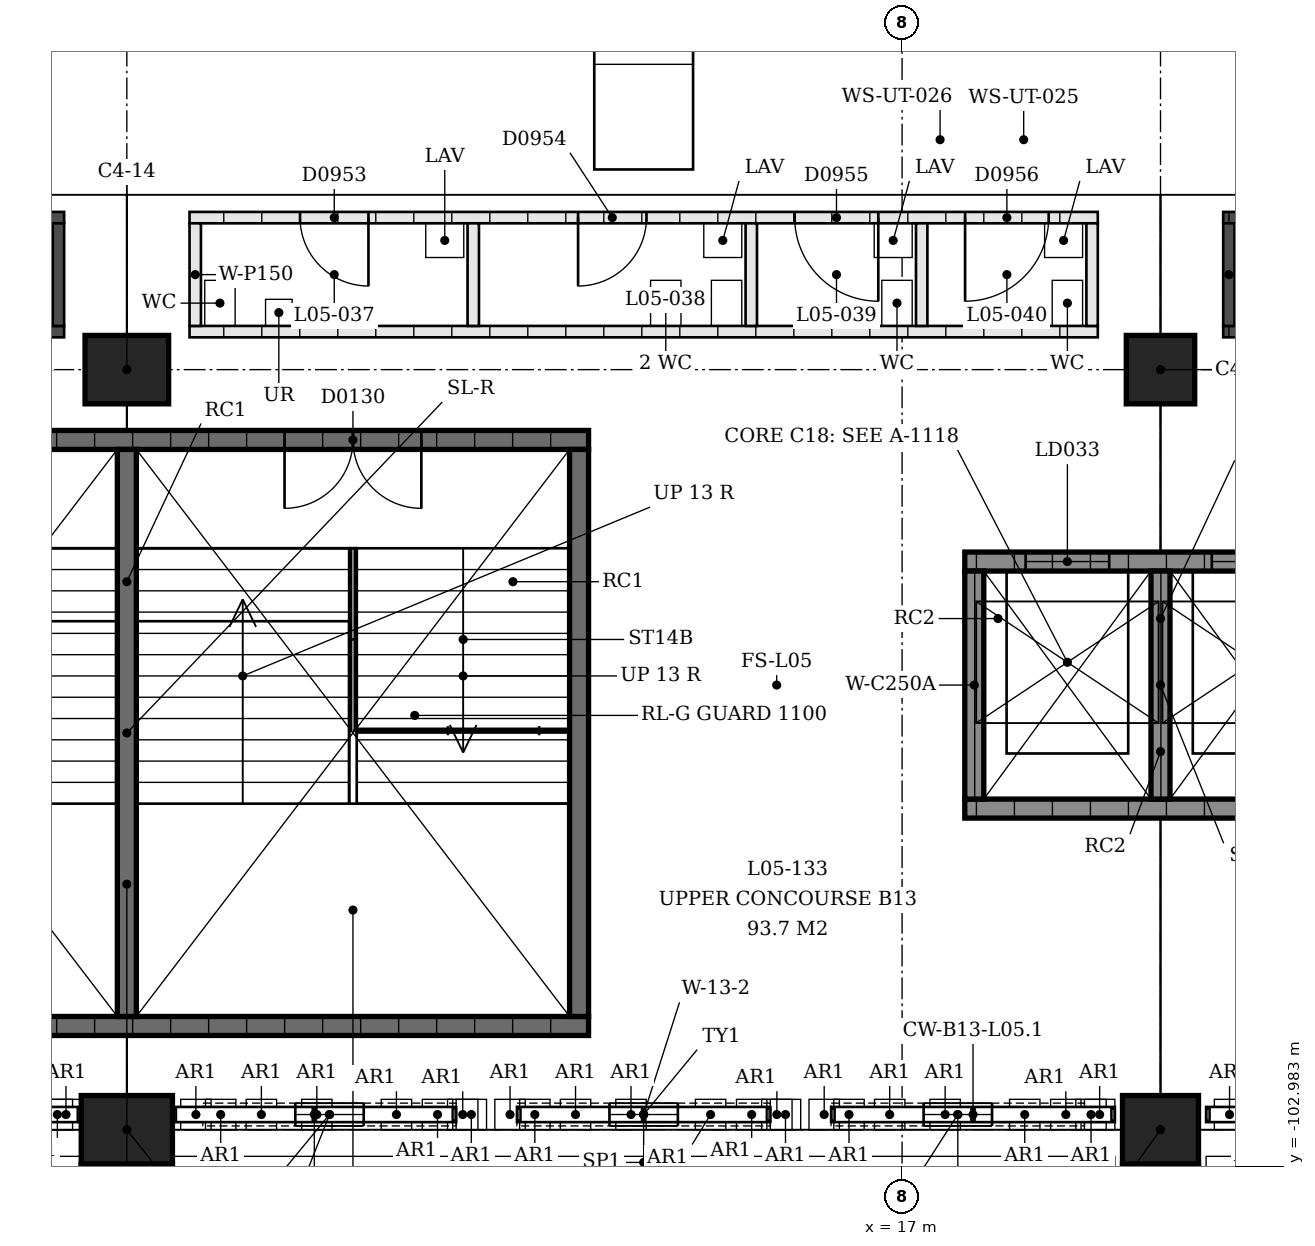
"""IFC4 building model, lengths in metres.
Left out: names, types, materials, properties, quantities, classifications, styles, units other than length and angle.
Written with IfcOpenShell. Run it as: python <this file> out.ifc"""

import sys

from ifc_helpers import new_model, si_unit, direction, frame, frame_2d, origin, origin_2d, place, context, subcontext, project, spatial, polyline, rectangle, outline, extrude, element, fill, save


model = new_model("IFC4")
c1 = context("Model", 3, precision=1e-05, world=origin(), true_north=direction((0.0, 1.0)))
c2 = subcontext(c1, "Body", "Model", "MODEL_VIEW")
j1 = project(units=[si_unit("LENGTHUNIT", "METRE"), si_unit("PLANEANGLEUNIT", "RADIAN")], contexts=[c1])
p1 = place(None, origin())
s1 = spatial("IfcSite", under=j1, at=p1, CompositionType="ELEMENT")
p2 = place(p1, origin())
s2 = spatial("IfcBuilding", under=s1, at=p2, CompositionType="ELEMENT")
p3 = place(p2, frame((0.0, 0.0, 22.5)))
s3 = spatial("IfcBuildingStorey", under=s2, at=p3, CompositionType="ELEMENT", Elevation=22.5)
p4 = place(p3, frame((20.4, -92.5, 0.0), z_axis=(0.0, 0.0, 1.0), x_axis=(1.0, 0.0, 0.0)))
e1 = element("IfcColumn", 1, at=p4, inside=s3, PredefinedType="COLUMN", context=c2, shape_type="SweptSolid", body=[
    extrude(rectangle(XDim=0.9, YDim=0.9, at=origin_2d()), origin(), (0.0, 0.0, 1.0), 6.5),
])
p5 = place(p3, frame((20.4, -102.5, 0.0), z_axis=(0.0, 0.0, 1.0), x_axis=(1.0, 0.0, 0.0)))
e2 = element("IfcColumn", 2, at=p5, inside=s3, PredefinedType="COLUMN", context=c2, shape_type="SweptSolid", body=[
    extrude(rectangle(XDim=1.0, YDim=0.9, at=origin_2d()), origin(), (0.0, 0.0, 1.0), 6.5),
])
p6 = place(p3, frame((6.8, -92.5, 0.0), z_axis=(0.0, 0.0, 1.0), x_axis=(1.0, 0.0, 0.0)))
e3 = element("IfcColumn", 3, at=p6, inside=s3, PredefinedType="COLUMN", context=c2, shape_type="SweptSolid", body=[
    extrude(rectangle(XDim=1.1, YDim=0.9, at=origin_2d()), origin(), (0.0, 0.0, 1.0), 6.5),
])
p7 = place(p3, frame((6.8, -102.5, 0.0), z_axis=(0.0, 0.0, 1.0), x_axis=(1.0, 0.0, 0.0)))
e4 = element("IfcColumn", 4, at=p7, inside=s3, PredefinedType="COLUMN", context=c2, shape_type="SweptSolid", body=[
    extrude(rectangle(XDim=1.2, YDim=0.9, at=origin_2d()), origin(), (0.0, 0.0, 1.0), 6.5),
])
p8 = place(p3, frame((19.4, -102.3, 4.1), z_axis=(0.0, 0.0, 1.0), x_axis=(-1.0, 0.0, 0.0)))
e5 = element("IfcWall", 5, at=p8, inside=s3, PredefinedType="SOLIDWALL", context=c2, shape_type="SweptSolid", body=[
    extrude(outline(polyline([(0.0, 0.0), (3.333, 0.0), (3.333, 0.05), (3.225, 1.288), (2.905, 2.541), (2.38, 3.722), (1.667, 4.8), (0.953, 3.722), (0.428, 2.541), (0.108, 1.288), (0.0, 0.05), (0.0, 0.0)])), frame((0.0, 0.15, 0.0), z_axis=(0.0, -1.0, 0.0), x_axis=(1.0, 0.0, 0.0)), (0.0, 0.0, 1.0), 0.3),
])
p9 = place(p8, frame((1.217, 0.0, 0.4)))
e6 = element("IfcOpeningElement", 6, at=p9, cuts=e5, PredefinedType="OPENING", context=c2, shape_type="SweptSolid", body=[
    extrude(rectangle(XDim=0.9, YDim=3.6, at=frame_2d((0.45, 1.8))), frame((0.0, 0.16, 0.0), z_axis=(0.0, -1.0, 0.0), x_axis=(1.0, 0.0, 0.0)), (0.0, 0.0, 1.0), 0.32),
])
p10 = place(p3, frame((15.267, -102.3, 4.1), z_axis=(0.0, 0.0, 1.0), x_axis=(-1.0, 0.0, 0.0)))
e7 = element("IfcWall", 7, at=p10, inside=s3, PredefinedType="SOLIDWALL", context=c2, shape_type="SweptSolid", body=[
    extrude(outline(polyline([(0.0, 0.0), (3.333, 0.0), (3.333, 0.05), (3.225, 1.288), (2.905, 2.541), (2.38, 3.722), (1.667, 4.8), (0.953, 3.722), (0.428, 2.541), (0.108, 1.288), (0.0, 0.05), (0.0, 0.0)])), frame((0.0, 0.15, 0.0), z_axis=(0.0, -1.0, 0.0), x_axis=(1.0, 0.0, 0.0)), (0.0, 0.0, 1.0), 0.3),
])
p11 = place(p10, frame((1.217, 0.0, 0.4)))
e8 = element("IfcOpeningElement", 8, at=p11, cuts=e7, PredefinedType="OPENING", context=c2, shape_type="SweptSolid", body=[
    extrude(rectangle(XDim=0.9, YDim=3.6, at=frame_2d((0.45, 1.8))), frame((0.0, 0.16, 0.0), z_axis=(0.0, -1.0, 0.0), x_axis=(1.0, 0.0, 0.0)), (0.0, 0.0, 1.0), 0.32),
])
p12 = place(p3, frame((11.133, -102.3, 4.1), z_axis=(0.0, 0.0, 1.0), x_axis=(-1.0, 0.0, 0.0)))
e9 = element("IfcWall", 9, at=p12, inside=s3, PredefinedType="SOLIDWALL", context=c2, shape_type="SweptSolid", body=[
    extrude(outline(polyline([(0.0, 0.0), (3.333, 0.0), (3.333, 0.05), (3.225, 1.288), (2.905, 2.541), (2.38, 3.722), (1.667, 4.8), (0.953, 3.722), (0.428, 2.541), (0.108, 1.288), (0.0, 0.05), (0.0, 0.0)])), frame((0.0, 0.15, 0.0), z_axis=(0.0, -1.0, 0.0), x_axis=(1.0, 0.0, 0.0)), (0.0, 0.0, 1.0), 0.3),
])
p13 = place(p12, frame((1.217, 0.0, 0.4)))
e10 = element("IfcOpeningElement", 10, at=p13, cuts=e9, PredefinedType="OPENING", context=c2, shape_type="SweptSolid", body=[
    extrude(rectangle(XDim=0.9, YDim=3.6, at=frame_2d((0.45, 1.8))), frame((0.0, 0.16, 0.0), z_axis=(0.0, -1.0, 0.0), x_axis=(1.0, 0.0, 0.0)), (0.0, 0.0, 1.0), 0.32),
])
p14 = place(p3, frame((0.725, -93.425, 0.0), z_axis=(0.0, 0.0, 1.0), x_axis=(1.0, 0.0, 0.0)))
e11 = element("IfcWall", 11, at=p14, inside=s3, PredefinedType="SHEAR", context=c2, shape_type="SweptSolid", body=[
    extrude(rectangle(XDim=12.15, YDim=0.25, at=frame_2d((6.075, 0.0))), origin(), (0.0, 0.0, 1.0), 2.1),
])
p15 = place(p14, frame((2.2, 0.0, 0.0)))
e12 = element("IfcOpeningElement", 12, at=p15, cuts=e11, PredefinedType="OPENING", context=c2, shape_type="SweptSolid", body=[
    extrude(rectangle(XDim=1.8, YDim=2.1, at=frame_2d((0.9, 1.05))), frame((0.0, 0.125, 0.0), z_axis=(0.0, -1.0, 0.0), x_axis=(1.0, 0.0, 0.0)), (0.0, 0.0, 1.0), 0.25),
])
p16 = place(p14, frame((8.15, 0.0, 0.0)))
e13 = element("IfcOpeningElement", 13, at=p16, cuts=e11, PredefinedType="OPENING", context=c2, shape_type="SweptSolid", body=[
    extrude(rectangle(XDim=1.8, YDim=2.1, at=frame_2d((0.9, 1.05))), frame((0.0, 0.125, 0.0), z_axis=(0.0, -1.0, 0.0), x_axis=(1.0, 0.0, 0.0)), (0.0, 0.0, 1.0), 0.25),
])
p17 = place(p3, frame((0.725, -101.135, 0.0), z_axis=(0.0, 0.0, 1.0), x_axis=(1.0, 0.0, 0.0)))
e14 = element("IfcWall", 14, at=p17, inside=s3, PredefinedType="SHEAR", context=c2, shape_type="SweptSolid", body=[
    extrude(rectangle(XDim=12.15, YDim=0.25, at=frame_2d((6.075, 0.0))), origin(), (0.0, 0.0, 1.0), 2.1),
])
for number, where, z_axis, x_axis in (
    (15, (12.75, -93.55, 0.0), (0.0, 0.0, 1.0), (0.0, -1.0, 0.0)),
    (16, (6.8, -93.55, 0.0), (0.0, 0.0, 1.0), (0.0, -1.0, 0.0)),
):
    element("IfcWall", number, at=place(p3, frame(where, z_axis=z_axis, x_axis=x_axis)), inside=s3, PredefinedType="SHEAR", context=c2, shape_type="SweptSolid", body=[
        extrude(rectangle(XDim=7.46, YDim=0.25, at=frame_2d((3.73, 0.0))), origin(), (0.0, 0.0, 1.0), 2.1),
    ])
p18 = place(p3, frame((17.825, -95.025, 0.0), z_axis=(0.0, 0.0, 1.0), x_axis=(1.0, 0.0, 0.0)))
e17 = element("IfcWall", 17, at=p18, inside=s3, PredefinedType="SHEAR", context=c2, shape_type="SweptSolid", body=[
    extrude(rectangle(XDim=5.15, YDim=0.25, at=frame_2d((2.575, 0.0))), origin(), (0.0, 0.0, 1.0), 3.4),
])
p19 = place(p18, frame((0.8, 0.0, 0.0)))
e18 = element("IfcOpeningElement", 18, at=p19, cuts=e17, PredefinedType="OPENING", context=c2, shape_type="SweptSolid", body=[
    extrude(rectangle(XDim=1.1, YDim=2.1, at=frame_2d((0.55, 1.05))), frame((0.0, 0.125, 0.0), z_axis=(0.0, -1.0, 0.0), x_axis=(1.0, 0.0, 0.0)), (0.0, 0.0, 1.0), 0.25),
])
p20 = place(p18, frame((3.25, 0.0, 0.0)))
e19 = element("IfcOpeningElement", 19, at=p20, cuts=e17, PredefinedType="OPENING", context=c2, shape_type="SweptSolid", body=[
    extrude(rectangle(XDim=1.1, YDim=2.1, at=frame_2d((0.55, 1.05))), frame((0.0, 0.125, 0.0), z_axis=(0.0, -1.0, 0.0), x_axis=(1.0, 0.0, 0.0)), (0.0, 0.0, 1.0), 0.25),
])
p21 = place(p3, frame((17.825, -98.275, 0.0), z_axis=(0.0, 0.0, 1.0), x_axis=(1.0, 0.0, 0.0)))
e20 = element("IfcWall", 20, at=p21, inside=s3, PredefinedType="SHEAR", context=c2, shape_type="SweptSolid", body=[
    extrude(rectangle(XDim=5.15, YDim=0.25, at=frame_2d((2.575, 0.0))), origin(), (0.0, 0.0, 1.0), 3.4),
])
for number, where, z_axis, x_axis in (
    (21, (17.95, -95.15, 0.0), (0.0, 0.0, 1.0), (0.0, -1.0, 0.0)),
    (22, (20.4, -95.15, 0.0), (0.0, 0.0, 1.0), (0.0, -1.0, 0.0)),
):
    element("IfcWall", number, at=place(p3, frame(where, z_axis=z_axis, x_axis=x_axis)), inside=s3, PredefinedType="SHEAR", context=c2, shape_type="SweptSolid", body=[
        extrude(rectangle(XDim=3.0, YDim=0.25, at=frame_2d((1.5, 0.0))), origin(), (0.0, 0.0, 1.0), 3.4),
    ])
p22 = place(p3, frame((33.175, -90.5, 0.0), z_axis=(0.0, 0.0, 1.0), x_axis=(-1.0, 0.0, 0.0)))
e23 = element("IfcWall", 23, at=p22, inside=s3, PredefinedType="SOLIDWALL", context=c2, shape_type="SweptSolid", body=[
    extrude(rectangle(XDim=11.95, YDim=0.15, at=frame_2d((5.975, 0.0))), origin(), (0.0, 0.0, 1.0), 3.0),
])
p23 = place(p22, frame((2.525, 0.0, 0.0)))
e24 = element("IfcOpeningElement", 24, at=p23, cuts=e23, PredefinedType="OPENING", context=c2, shape_type="SweptSolid", body=[
    extrude(rectangle(XDim=1.0, YDim=2.1, at=frame_2d((0.5, 1.05))), frame((0.0, 0.075, 0.0), z_axis=(0.0, -1.0, 0.0), x_axis=(1.0, 0.0, 0.0)), (0.0, 0.0, 1.0), 0.15),
])
p24 = place(p22, frame((8.425, 0.0, 0.0)))
e25 = element("IfcOpeningElement", 25, at=p24, cuts=e23, PredefinedType="OPENING", context=c2, shape_type="SweptSolid", body=[
    extrude(rectangle(XDim=1.0, YDim=2.1, at=frame_2d((0.5, 1.05))), frame((0.0, 0.075, 0.0), z_axis=(0.0, -1.0, 0.0), x_axis=(1.0, 0.0, 0.0)), (0.0, 0.0, 1.0), 0.15),
])
p25 = place(p3, frame((33.175, -92.0, 0.0), z_axis=(0.0, 0.0, 1.0), x_axis=(-1.0, 0.0, 0.0)))
e26 = element("IfcWall", 26, at=p25, inside=s3, PredefinedType="SOLIDWALL", context=c2, shape_type="SweptSolid", body=[
    extrude(rectangle(XDim=11.95, YDim=0.15, at=frame_2d((5.975, 0.0))), origin(), (0.0, 0.0, 1.0), 3.0),
])
p26 = place(p3, frame((21.3, -90.575, 0.0), z_axis=(0.0, 0.0, 1.0), x_axis=(0.0, -1.0, 0.0)))
e27 = element("IfcWall", 27, at=p26, inside=s3, PredefinedType="SOLIDWALL", context=c2, shape_type="SweptSolid", body=[
    extrude(rectangle(XDim=1.35, YDim=0.15, at=frame_2d((0.675, 0.0))), origin(), (0.0, 0.0, 1.0), 3.0),
])
p27 = place(p3, frame((7.625, -90.5, 0.0), z_axis=(0.0, 0.0, 1.0), x_axis=(1.0, 0.0, 0.0)))
e28 = element("IfcWall", 28, at=p27, inside=s3, PredefinedType="PARTITIONING", context=c2, shape_type="SweptSolid", body=[
    extrude(rectangle(XDim=11.95, YDim=0.15, at=frame_2d((5.975, 0.0))), origin(), (0.0, 0.0, 1.0), 3.0),
])
p28 = place(p27, frame((1.454, 0.0, 0.0)))
e29 = element("IfcOpeningElement", 29, at=p28, cuts=e28, PredefinedType="OPENING", context=c2, shape_type="SweptSolid", body=[
    extrude(rectangle(XDim=0.9, YDim=2.1, at=frame_2d((0.45, 1.05))), frame((0.0, 0.075, 0.0), z_axis=(0.0, -1.0, 0.0), x_axis=(1.0, 0.0, 0.0)), (0.0, 0.0, 1.0), 0.15),
])
p29 = place(p27, frame((5.112, 0.0, 0.0)))
e30 = element("IfcOpeningElement", 30, at=p29, cuts=e28, PredefinedType="OPENING", context=c2, shape_type="SweptSolid", body=[
    extrude(rectangle(XDim=0.9, YDim=2.1, at=frame_2d((0.45, 1.05))), frame((0.0, 0.075, 0.0), z_axis=(0.0, -1.0, 0.0), x_axis=(1.0, 0.0, 0.0)), (0.0, 0.0, 1.0), 0.15),
])
p30 = place(p27, frame((7.962, 0.0, 0.0)))
e31 = element("IfcOpeningElement", 31, at=p30, cuts=e28, PredefinedType="OPENING", context=c2, shape_type="SweptSolid", body=[
    extrude(rectangle(XDim=1.1, YDim=2.1, at=frame_2d((0.55, 1.05))), frame((0.0, 0.075, 0.0), z_axis=(0.0, -1.0, 0.0), x_axis=(1.0, 0.0, 0.0)), (0.0, 0.0, 1.0), 0.15),
])
p31 = place(p27, frame((10.204, 0.0, 0.0)))
e32 = element("IfcOpeningElement", 32, at=p31, cuts=e28, PredefinedType="OPENING", context=c2, shape_type="SweptSolid", body=[
    extrude(rectangle(XDim=1.1, YDim=2.1, at=frame_2d((0.55, 1.05))), frame((0.0, 0.075, 0.0), z_axis=(0.0, -1.0, 0.0), x_axis=(1.0, 0.0, 0.0)), (0.0, 0.0, 1.0), 0.15),
])
p32 = place(p3, frame((7.625, -92.0, 0.0), z_axis=(0.0, 0.0, 1.0), x_axis=(1.0, 0.0, 0.0)))
e33 = element("IfcWall", 33, at=p32, inside=s3, PredefinedType="PARTITIONING", context=c2, shape_type="SweptSolid", body=[
    extrude(rectangle(XDim=11.95, YDim=0.15, at=frame_2d((5.975, 0.0))), origin(), (0.0, 0.0, 1.0), 3.0),
])
for number, where, z_axis, x_axis in (
    (34, (7.7, -90.575, 0.0), (0.0, 0.0, 1.0), (0.0, -1.0, 0.0)),
    (35, (11.358, -90.575, 0.0), (0.0, 0.0, 1.0), (0.0, -1.0, 0.0)),
    (36, (15.016, -90.575, 0.0), (0.0, 0.0, 1.0), (0.0, -1.0, 0.0)),
    (37, (17.258, -90.575, 0.0), (0.0, 0.0, 1.0), (0.0, -1.0, 0.0)),
    (38, (19.5, -90.575, 0.0), (0.0, 0.0, 1.0), (0.0, -1.0, 0.0)),
):
    element("IfcWall", number, at=place(p3, frame(where, z_axis=z_axis, x_axis=x_axis)), inside=s3, PredefinedType="PARTITIONING", context=c2, shape_type="SweptSolid", body=[
        extrude(rectangle(XDim=1.35, YDim=0.15, at=frame_2d((0.675, 0.0))), origin(), (0.0, 0.0, 1.0), 3.0),
    ])
p33 = place(p3, frame((5.975, -90.5, 0.0), z_axis=(0.0, 0.0, 1.0), x_axis=(-1.0, 0.0, 0.0)))
e39 = element("IfcWall", 39, at=p33, inside=s3, PredefinedType="SOLIDWALL", context=c2, shape_type="SweptSolid", body=[
    extrude(rectangle(XDim=11.95, YDim=0.15, at=frame_2d((5.975, 0.0))), origin(), (0.0, 0.0, 1.0), 3.0),
])
p34 = place(p33, frame((2.525, 0.0, 0.0)))
e40 = element("IfcOpeningElement", 40, at=p34, cuts=e39, PredefinedType="OPENING", context=c2, shape_type="SweptSolid", body=[
    extrude(rectangle(XDim=1.0, YDim=2.1, at=frame_2d((0.5, 1.05))), frame((0.0, 0.075, 0.0), z_axis=(0.0, -1.0, 0.0), x_axis=(1.0, 0.0, 0.0)), (0.0, 0.0, 1.0), 0.15),
])
p35 = place(p33, frame((8.425, 0.0, 0.0)))
e41 = element("IfcOpeningElement", 41, at=p35, cuts=e39, PredefinedType="OPENING", context=c2, shape_type="SweptSolid", body=[
    extrude(rectangle(XDim=1.0, YDim=2.1, at=frame_2d((0.5, 1.05))), frame((0.0, 0.075, 0.0), z_axis=(0.0, -1.0, 0.0), x_axis=(1.0, 0.0, 0.0)), (0.0, 0.0, 1.0), 0.15),
])
p36 = place(p3, frame((5.975, -92.0, 0.0), z_axis=(0.0, 0.0, 1.0), x_axis=(-1.0, 0.0, 0.0)))
e42 = element("IfcWall", 42, at=p36, inside=s3, PredefinedType="SOLIDWALL", context=c2, shape_type="SweptSolid", body=[
    extrude(rectangle(XDim=11.95, YDim=0.15, at=frame_2d((5.975, 0.0))), origin(), (0.0, 0.0, 1.0), 3.0),
])
p37 = place(p3, frame((5.9, -90.575, 0.0), z_axis=(0.0, 0.0, 1.0), x_axis=(0.0, -1.0, 0.0)))
e43 = element("IfcWall", 43, at=p37, inside=s3, PredefinedType="SOLIDWALL", context=c2, shape_type="SweptSolid", body=[
    extrude(rectangle(XDim=1.35, YDim=0.15, at=frame_2d((0.675, 0.0))), origin(), (0.0, 0.0, 1.0), 3.0),
])
p38 = place(p9, origin())
e44 = element("IfcWindow", 44, at=p38, inside=s3, PartitioningType="SINGLE_PANEL", PredefinedType="WINDOW", context=c2, shape_type="SweptSolid", body=[
    extrude(rectangle(XDim=0.9, YDim=3.6, at=frame_2d((0.45, 1.8))), frame((0.0, 0.03, 0.0), z_axis=(0.0, -1.0, 0.0), x_axis=(1.0, 0.0, 0.0)), (0.0, 0.0, 1.0), 0.06),
])
fill(e6, e44)
p39 = place(p11, origin())
e45 = element("IfcWindow", 45, at=p39, inside=s3, PartitioningType="SINGLE_PANEL", PredefinedType="WINDOW", context=c2, shape_type="SweptSolid", body=[
    extrude(rectangle(XDim=0.9, YDim=3.6, at=frame_2d((0.45, 1.8))), frame((0.0, 0.03, 0.0), z_axis=(0.0, -1.0, 0.0), x_axis=(1.0, 0.0, 0.0)), (0.0, 0.0, 1.0), 0.06),
])
fill(e8, e45)
p40 = place(p13, origin())
e46 = element("IfcWindow", 46, at=p40, inside=s3, PartitioningType="SINGLE_PANEL", PredefinedType="WINDOW", context=c2, shape_type="SweptSolid", body=[
    extrude(rectangle(XDim=0.9, YDim=3.6, at=frame_2d((0.45, 1.8))), frame((0.0, 0.03, 0.0), z_axis=(0.0, -1.0, 0.0), x_axis=(1.0, 0.0, 0.0)), (0.0, 0.0, 1.0), 0.06),
])
fill(e10, e46)
p41 = place(p16, origin())
e47 = element("IfcDoor", 47, at=p41, inside=s3, OperationType="DOUBLE_DOOR_SINGLE_SWING", PredefinedType="DOOR", context=c2, shape_type="SweptSolid", body=[
    extrude(rectangle(XDim=1.8, YDim=2.1, at=frame_2d((0.9, 1.05))), frame((0.0, 0.025, 0.0), z_axis=(0.0, -1.0, 0.0), x_axis=(1.0, 0.0, 0.0)), (0.0, 0.0, 1.0), 0.05),
])
fill(e13, e47)
p42 = place(p19, origin())
e48 = element("IfcDoor", 48, at=p42, inside=s3, OperationType="SLIDING_TO_LEFT", PredefinedType="DOOR", context=c2, shape_type="SweptSolid", body=[
    extrude(rectangle(XDim=1.1, YDim=2.1, at=frame_2d((0.55, 1.05))), frame((0.0, 0.025, 0.0), z_axis=(0.0, -1.0, 0.0), x_axis=(1.0, 0.0, 0.0)), (0.0, 0.0, 1.0), 0.05),
])
fill(e18, e48)
p43 = place(p20, origin())
e49 = element("IfcDoor", 49, at=p43, inside=s3, OperationType="SLIDING_TO_LEFT", PredefinedType="DOOR", context=c2, shape_type="SweptSolid", body=[
    extrude(rectangle(XDim=1.1, YDim=2.1, at=frame_2d((0.55, 1.05))), frame((0.0, 0.025, 0.0), z_axis=(0.0, -1.0, 0.0), x_axis=(1.0, 0.0, 0.0)), (0.0, 0.0, 1.0), 0.05),
])
fill(e19, e49)
p44 = place(p28, origin())
e50 = element("IfcDoor", 50, at=p44, inside=s3, OperationType="SINGLE_SWING_RIGHT", PredefinedType="DOOR", context=c2, shape_type="SweptSolid", body=[
    extrude(rectangle(XDim=0.9, YDim=2.1, at=frame_2d((0.45, 1.05))), frame((0.0, 0.025, 0.0), z_axis=(0.0, -1.0, 0.0), x_axis=(1.0, 0.0, 0.0)), (0.0, 0.0, 1.0), 0.05),
])
fill(e29, e50)
p45 = place(p29, origin())
e51 = element("IfcDoor", 51, at=p45, inside=s3, OperationType="SINGLE_SWING_LEFT", PredefinedType="DOOR", context=c2, shape_type="SweptSolid", body=[
    extrude(rectangle(XDim=0.9, YDim=2.1, at=frame_2d((0.45, 1.05))), frame((0.0, 0.025, 0.0), z_axis=(0.0, -1.0, 0.0), x_axis=(1.0, 0.0, 0.0)), (0.0, 0.0, 1.0), 0.05),
])
fill(e30, e51)
p46 = place(p30, origin())
e52 = element("IfcDoor", 52, at=p46, inside=s3, OperationType="SINGLE_SWING_RIGHT", PredefinedType="DOOR", context=c2, shape_type="SweptSolid", body=[
    extrude(rectangle(XDim=1.1, YDim=2.1, at=frame_2d((0.55, 1.05))), frame((0.0, 0.025, 0.0), z_axis=(0.0, -1.0, 0.0), x_axis=(1.0, 0.0, 0.0)), (0.0, 0.0, 1.0), 0.05),
])
fill(e31, e52)
p47 = place(p31, origin())
e53 = element("IfcDoor", 53, at=p47, inside=s3, OperationType="SINGLE_SWING_LEFT", PredefinedType="DOOR", context=c2, shape_type="SweptSolid", body=[
    extrude(rectangle(XDim=1.1, YDim=2.1, at=frame_2d((0.55, 1.05))), frame((0.0, 0.025, 0.0), z_axis=(0.0, -1.0, 0.0), x_axis=(1.0, 0.0, 0.0)), (0.0, 0.0, 1.0), 0.05),
])
fill(e32, e53)
save(model, sys.argv[1])
